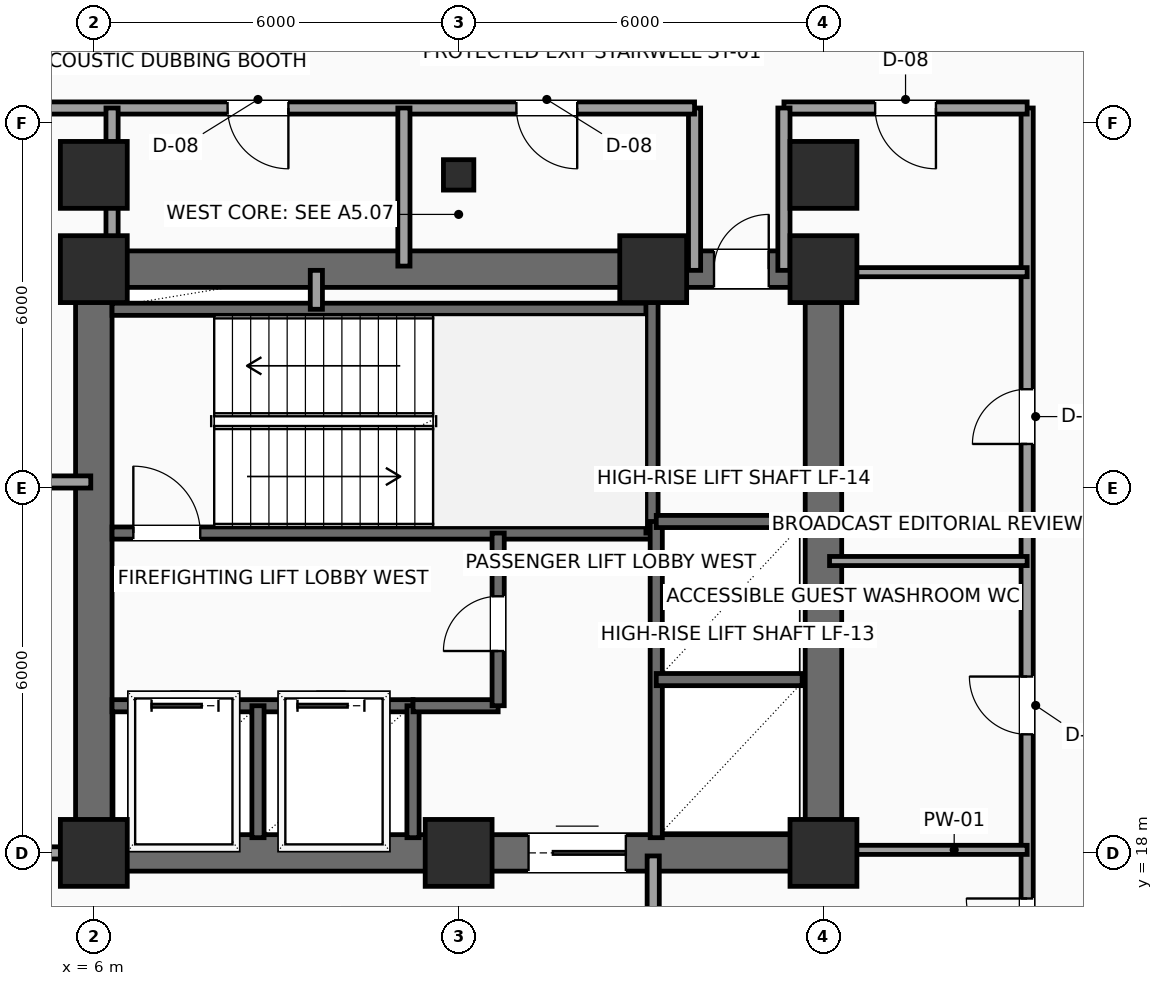
"""IFC4 building model, lengths in metres.
Left out: names, types, materials, properties, quantities, classifications, styles, units other than length and angle.
Written with IfcOpenShell. Run it as: python <this file> out.ifc"""

import sys

from ifc_helpers import new_model, si_unit, direction, frame, frame_2d, origin, origin_2d, place, context, subcontext, project, spatial, rectangle, hollow_rectangle, extrude, element, fill, save


model = new_model("IFC4")
c1 = context("Model", 3, precision=1e-05, world=origin(), true_north=direction((0.0, 1.0)))
c2 = subcontext(c1, "Body", "Model", "MODEL_VIEW")
j1 = project(units=[si_unit("LENGTHUNIT", "METRE"), si_unit("PLANEANGLEUNIT", "RADIAN")], contexts=[c1])
p1 = place(None, origin())
s1 = spatial("IfcSite", under=j1, at=p1, CompositionType="ELEMENT")
p2 = place(p1, origin())
s2 = spatial("IfcBuilding", under=s1, at=p2, CompositionType="ELEMENT")
p3 = place(p2, frame((0.0, 0.0, 119.4)))
s3 = spatial("IfcBuildingStorey", under=s2, at=p3, CompositionType="ELEMENT", Elevation=119.4)
for number, where, z_axis, x_axis in (
    (1, (6.0, 18.0, 0.0), (0.0, 0.0, 1.0), (1.0, 0.0, 0.0)),
    (2, (12.0, 18.0, 0.0), (0.0, 0.0, 1.0), (1.0, 0.0, 0.0)),
    (3, (18.0, 18.0, 0.0), (0.0, 0.0, 1.0), (1.0, 0.0, 0.0)),
    (4, (6.0, 27.6, 0.0), (0.0, 0.0, 1.0), (1.0, 0.0, 0.0)),
    (5, (15.2, 27.6, 0.0), (0.0, 0.0, 1.0), (1.0, 0.0, 0.0)),
    (6, (18.0, 27.6, 0.0), (0.0, 0.0, 1.0), (1.0, 0.0, 0.0)),
    (7, (6.0, 29.15, 0.0), (0.0, 0.0, 1.0), (1.0, 0.0, 0.0)),
):
    element("IfcColumn", number, at=place(p3, frame(where, z_axis=z_axis, x_axis=x_axis)), inside=s3, PredefinedType="COLUMN", context=c2, shape_type="SweptSolid", body=[
        extrude(rectangle(XDim=1.1, YDim=1.1, at=origin_2d()), origin(), (0.0, 0.0, 1.0), 3.75),
    ])
p4 = place(p3, frame((12.0, 29.15, 0.0), z_axis=(0.0, 0.0, 1.0), x_axis=(1.0, 0.0, 0.0)))
e8 = element("IfcColumn", 8, at=p4, inside=s3, PredefinedType="COLUMN", context=c2, shape_type="SweptSolid", body=[
    extrude(hollow_rectangle(XDim=0.5, YDim=0.5, WallThickness=0.025, InnerFilletRadius=0.025, OuterFilletRadius=0.04, at=origin_2d()), origin(), (0.0, 0.0, 1.0), 3.75),
])
p5 = place(p3, frame((18.0, 29.15, 0.0), z_axis=(0.0, 0.0, 1.0), x_axis=(1.0, 0.0, 0.0)))
e9 = element("IfcColumn", 9, at=p5, inside=s3, PredefinedType="COLUMN", context=c2, shape_type="SweptSolid", body=[
    extrude(rectangle(XDim=1.1, YDim=1.1, at=origin_2d()), origin(), (0.0, 0.0, 1.0), 3.75),
])
p6 = place(p3, frame((6.0, 18.0, 0.0), z_axis=(0.0, 0.0, 1.0), x_axis=(1.0, 0.0, 0.0)))
e10 = element("IfcWall", 10, at=p6, inside=s3, PredefinedType="SHEAR", context=c2, shape_type="SweptSolid", body=[
    extrude(rectangle(XDim=12.0, YDim=0.6, at=frame_2d((6.0, 0.0))), origin(), (0.0, 0.0, 1.0), 3.525),
])
p7 = place(p6, frame((7.15, 0.0, 0.0)))
e11 = element("IfcOpeningElement", 11, at=p7, cuts=e10, PredefinedType="OPENING", context=c2, shape_type="SweptSolid", body=[
    extrude(rectangle(XDim=1.6, YDim=2.3, at=frame_2d((0.8, 1.15))), frame((0.0, 0.31, 0.0), z_axis=(0.0, -1.0, 0.0), x_axis=(1.0, 0.0, 0.0)), (0.0, 0.0, 1.0), 0.62),
])
p8 = place(p3, frame((6.0, 27.6, 0.0), z_axis=(0.0, 0.0, 1.0), x_axis=(1.0, 0.0, 0.0)))
e12 = element("IfcWall", 12, at=p8, inside=s3, PredefinedType="SHEAR", context=c2, shape_type="SweptSolid", body=[
    extrude(rectangle(XDim=12.0, YDim=0.6, at=frame_2d((6.0, 0.0))), origin(), (0.0, 0.0, 1.0), 3.525),
])
p9 = place(p8, frame((10.2, 0.0, 0.0)))
e13 = element("IfcOpeningElement", 13, at=p9, cuts=e12, PredefinedType="OPENING", context=c2, shape_type="SweptSolid", body=[
    extrude(rectangle(XDim=0.9, YDim=2.15, at=frame_2d((0.45, 1.075))), frame((0.0, 0.31, 0.0), z_axis=(0.0, -1.0, 0.0), x_axis=(1.0, 0.0, 0.0)), (0.0, 0.0, 1.0), 0.62),
])
for number, where, z_axis, x_axis in (
    (14, (6.0, 18.0, 0.0), (0.0, 0.0, 1.0), (0.0, 1.0, 0.0)),
    (15, (18.0, 18.0, 0.0), (0.0, 0.0, 1.0), (0.0, 1.0, 0.0)),
):
    element("IfcWall", number, at=place(p3, frame(where, z_axis=z_axis, x_axis=x_axis)), inside=s3, PredefinedType="SHEAR", context=c2, shape_type="SweptSolid", body=[
        extrude(rectangle(XDim=9.6, YDim=0.6, at=frame_2d((4.8, 0.0))), origin(), (0.0, 0.0, 1.0), 3.525),
    ])
p10 = place(p3, frame((6.3, 23.26, 0.0), z_axis=(0.0, 0.0, 1.0), x_axis=(1.0, 0.0, 0.0)))
e16 = element("IfcWall", 16, at=p10, inside=s3, PredefinedType="SHEAR", context=c2, shape_type="SweptSolid", body=[
    extrude(rectangle(XDim=8.88, YDim=0.2, at=frame_2d((4.44, 0.0))), origin(), (0.0, 0.0, 1.0), 3.525),
])
p11 = place(p10, frame((0.35, 0.0, 0.0)))
e17 = element("IfcOpeningElement", 17, at=p11, cuts=e16, PredefinedType="OPENING", context=c2, shape_type="SweptSolid", body=[
    extrude(rectangle(XDim=1.1, YDim=2.2, at=frame_2d((0.55, 1.1))), frame((0.0, 0.11, 0.0), z_axis=(0.0, -1.0, 0.0), x_axis=(1.0, 0.0, 0.0)), (0.0, 0.0, 1.0), 0.22),
])
p12 = place(p3, frame((6.3, 26.94, 0.0), z_axis=(0.0, 0.0, 1.0), x_axis=(1.0, 0.0, 0.0)))
e18 = element("IfcWall", 18, at=p12, inside=s3, PredefinedType="SHEAR", context=c2, shape_type="SweptSolid", body=[
    extrude(rectangle(XDim=8.88, YDim=0.2, at=frame_2d((4.44, 0.0))), origin(), (0.0, 0.0, 1.0), 3.525),
])
p13 = place(p3, frame((15.18, 23.26, 0.0), z_axis=(0.0, 0.0, 1.0), x_axis=(0.0, 1.0, 0.0)))
e19 = element("IfcWall", 19, at=p13, inside=s3, PredefinedType="SHEAR", context=c2, shape_type="SweptSolid", body=[
    extrude(rectangle(XDim=4.04, YDim=0.2, at=frame_2d((2.02, 0.0))), origin(), (0.0, 0.0, 1.0), 3.525),
])
p14 = place(p3, frame((6.3, 20.42, 0.0), z_axis=(0.0, 0.0, 1.0), x_axis=(1.0, 0.0, 0.0)))
e20 = element("IfcWall", 20, at=p14, inside=s3, PredefinedType="SHEAR", context=c2, shape_type="SweptSolid", body=[
    extrude(rectangle(XDim=4.95, YDim=0.2, at=frame_2d((2.475, 0.0))), origin(), (0.0, 0.0, 1.0), 3.525),
])
p15 = place(p14, frame((0.65, 0.0, 0.0)))
e21 = element("IfcOpeningElement", 21, at=p15, cuts=e20, PredefinedType="OPENING", context=c2, shape_type="SweptSolid", body=[
    extrude(rectangle(XDim=1.1, YDim=2.2, at=frame_2d((0.55, 1.1))), frame((0.0, 0.11, 0.0), z_axis=(0.0, -1.0, 0.0), x_axis=(1.0, 0.0, 0.0)), (0.0, 0.0, 1.0), 0.22),
])
p16 = place(p14, frame((3.05, 0.0, 0.0)))
e22 = element("IfcOpeningElement", 22, at=p16, cuts=e20, PredefinedType="OPENING", context=c2, shape_type="SweptSolid", body=[
    extrude(rectangle(XDim=1.1, YDim=2.2, at=frame_2d((0.55, 1.1))), frame((0.0, 0.11, 0.0), z_axis=(0.0, -1.0, 0.0), x_axis=(1.0, 0.0, 0.0)), (0.0, 0.0, 1.0), 0.22),
])
for number, where, z_axis, x_axis in (
    (23, (8.7, 18.25, 0.0), (0.0, 0.0, 1.0), (0.0, 1.0, 0.0)),
    (24, (11.25, 18.25, 0.0), (0.0, 0.0, 1.0), (0.0, 1.0, 0.0)),
):
    element("IfcWall", number, at=place(p3, frame(where, z_axis=z_axis, x_axis=x_axis)), inside=s3, PredefinedType="SHEAR", context=c2, shape_type="SweptSolid", body=[
        extrude(rectangle(XDim=2.17, YDim=0.2, at=frame_2d((1.085, 0.0))), origin(), (0.0, 0.0, 1.0), 3.525),
    ])
p17 = place(p3, frame((11.25, 20.42, 0.0), z_axis=(0.0, 0.0, 1.0), x_axis=(1.0, 0.0, 0.0)))
e25 = element("IfcWall", 25, at=p17, inside=s3, PredefinedType="SHEAR", context=c2, shape_type="SweptSolid", body=[
    extrude(rectangle(XDim=1.4, YDim=0.2, at=frame_2d((0.7, 0.0))), origin(), (0.0, 0.0, 1.0), 3.525),
])
p18 = place(p3, frame((12.65, 20.42, 0.0), z_axis=(0.0, 0.0, 1.0), x_axis=(0.0, 1.0, 0.0)))
e26 = element("IfcWall", 26, at=p18, inside=s3, PredefinedType="SHEAR", context=c2, shape_type="SweptSolid", body=[
    extrude(rectangle(XDim=2.84, YDim=0.2, at=frame_2d((1.42, 0.0))), origin(), (0.0, 0.0, 1.0), 3.525),
])
p19 = place(p18, frame((0.9, 0.0, 0.0)))
e27 = element("IfcOpeningElement", 27, at=p19, cuts=e26, PredefinedType="OPENING", context=c2, shape_type="SweptSolid", body=[
    extrude(rectangle(XDim=0.9, YDim=2.15, at=frame_2d((0.45, 1.075))), frame((0.0, 0.11, 0.0), z_axis=(0.0, -1.0, 0.0), x_axis=(1.0, 0.0, 0.0)), (0.0, 0.0, 1.0), 0.22),
])
p20 = place(p3, frame((9.66, 26.94, 0.0), z_axis=(0.0, 0.0, 1.0), x_axis=(0.0, 1.0, 0.0)))
e28 = element("IfcWall", 28, at=p20, inside=s3, PredefinedType="SOLIDWALL", context=c2, shape_type="SweptSolid", body=[
    extrude(rectangle(XDim=0.64, YDim=0.2, at=frame_2d((0.32, 0.0))), origin(), (0.0, 0.0, 1.0), 3.525),
])
p21 = place(p3, frame((15.25, 18.25, 0.0), z_axis=(0.0, 0.0, 1.0), x_axis=(0.0, 1.0, 0.0)))
e29 = element("IfcWall", 29, at=p21, inside=s3, PredefinedType="SHEAR", context=c2, shape_type="SweptSolid", body=[
    extrude(rectangle(XDim=5.2, YDim=0.2, at=frame_2d((2.6, 0.0))), origin(), (0.0, 0.0, 1.0), 3.525),
])
p22 = place(p3, frame((15.25, 20.85, 0.0), z_axis=(0.0, 0.0, 1.0), x_axis=(1.0, 0.0, 0.0)))
e30 = element("IfcWall", 30, at=p22, inside=s3, PredefinedType="SHEAR", context=c2, shape_type="SweptSolid", body=[
    extrude(rectangle(XDim=2.4, YDim=0.2, at=frame_2d((1.2, 0.0))), origin(), (0.0, 0.0, 1.0), 3.525),
])
p23 = place(p3, frame((15.25, 23.45, 0.0), z_axis=(0.0, 0.0, 1.0), x_axis=(1.0, 0.0, 0.0)))
e31 = element("IfcWall", 31, at=p23, inside=s3, PredefinedType="SHEAR", context=c2, shape_type="SweptSolid", body=[
    extrude(rectangle(XDim=2.45, YDim=0.2, at=frame_2d((1.225, 0.0))), origin(), (0.0, 0.0, 1.0), 3.525),
])
p24 = place(p3, frame((15.2, 17.95, 0.0), z_axis=(0.0, 0.0, 1.0), x_axis=(0.0, -1.0, 0.0)))
e32 = element("IfcWall", 32, at=p24, inside=s3, PredefinedType="SOLIDWALL", context=c2, shape_type="SweptSolid", body=[
    extrude(rectangle(XDim=2.4, YDim=0.2, at=frame_2d((1.2, 0.0))), origin(), (0.0, 0.0, 1.0), 3.525),
])
p25 = place(p3, frame((21.35, 11.25, 0.0), z_axis=(0.0, 0.0, 1.0), x_axis=(0.0, 1.0, 0.0)))
e33 = element("IfcWall", 33, at=p25, inside=s3, PredefinedType="SOLIDWALL", context=c2, shape_type="SweptSolid", body=[
    extrude(rectangle(XDim=19.0, YDim=0.2, at=frame_2d((9.5, 0.0))), origin(), (0.0, 0.0, 1.0), 3.525),
])
p26 = place(p25, frame((8.7, 0.0, 0.0)))
e34 = element("IfcOpeningElement", 34, at=p26, cuts=e33, PredefinedType="OPENING", context=c2, shape_type="SweptSolid", body=[
    extrude(rectangle(XDim=0.95, YDim=2.15, at=frame_2d((0.475, 1.075))), frame((0.0, 0.11, 0.0), z_axis=(0.0, -1.0, 0.0), x_axis=(1.0, 0.0, 0.0)), (0.0, 0.0, 1.0), 0.22),
])
p27 = place(p25, frame((13.475, 0.0, 0.0)))
e35 = element("IfcOpeningElement", 35, at=p27, cuts=e33, PredefinedType="OPENING", context=c2, shape_type="SweptSolid", body=[
    extrude(rectangle(XDim=0.9, YDim=2.1, at=frame_2d((0.45, 1.05))), frame((0.0, 0.11, 0.0), z_axis=(0.0, -1.0, 0.0), x_axis=(1.0, 0.0, 0.0)), (0.0, 0.0, 1.0), 0.22),
])
p28 = place(p25, frame((5.0, 0.0, 0.0)))
e36 = element("IfcOpeningElement", 36, at=p28, cuts=e33, PredefinedType="OPENING", context=c2, shape_type="SweptSolid", body=[
    extrude(rectangle(XDim=1.0, YDim=2.2, at=frame_2d((0.5, 1.1))), frame((0.0, 0.11, 0.0), z_axis=(0.0, -1.0, 0.0), x_axis=(1.0, 0.0, 0.0)), (0.0, 0.0, 1.0), 0.22),
])
p29 = place(p3, frame((21.35, 30.25, 0.0), z_axis=(0.0, 0.0, 1.0), x_axis=(-1.0, 0.0, 0.0)))
e37 = element("IfcWall", 37, at=p29, inside=s3, PredefinedType="SOLIDWALL", context=c2, shape_type="SweptSolid", body=[
    extrude(rectangle(XDim=4.0, YDim=0.2, at=frame_2d((2.0, 0.0))), origin(), (0.0, 0.0, 1.0), 3.525),
])
p30 = place(p29, frame((1.5, 0.0, 0.0)))
e38 = element("IfcOpeningElement", 38, at=p30, cuts=e37, PredefinedType="OPENING", context=c2, shape_type="SweptSolid", body=[
    extrude(rectangle(XDim=1.0, YDim=2.2, at=frame_2d((0.5, 1.1))), frame((0.0, 0.11, 0.0), z_axis=(0.0, -1.0, 0.0), x_axis=(1.0, 0.0, 0.0)), (0.0, 0.0, 1.0), 0.22),
])
for number, where, z_axis, x_axis in (
    (39, (17.35, 30.25, 0.0), (0.0, 0.0, 1.0), (0.0, -1.0, 0.0)),
    (40, (15.88, 27.58, 0.0), (0.0, 0.0, 1.0), (0.0, 1.0, 0.0)),
):
    element("IfcWall", number, at=place(p3, frame(where, z_axis=z_axis, x_axis=x_axis)), inside=s3, PredefinedType="SOLIDWALL", context=c2, shape_type="SweptSolid", body=[
        extrude(rectangle(XDim=2.67, YDim=0.2, at=frame_2d((1.335, 0.0))), origin(), (0.0, 0.0, 1.0), 3.525),
    ])
p31 = place(p3, frame((15.88, 30.25, 0.0), z_axis=(0.0, 0.0, 1.0), x_axis=(-1.0, 0.0, 0.0)))
e41 = element("IfcWall", 41, at=p31, inside=s3, PredefinedType="SOLIDWALL", context=c2, shape_type="SweptSolid", body=[
    extrude(rectangle(XDim=15.58, YDim=0.2, at=frame_2d((7.79, 0.0))), origin(), (0.0, 0.0, 1.0), 3.525),
])
p32 = place(p31, frame((12.23, 0.0, 0.0)))
e42 = element("IfcOpeningElement", 42, at=p32, cuts=e41, PredefinedType="OPENING", context=c2, shape_type="SweptSolid", body=[
    extrude(rectangle(XDim=1.0, YDim=2.2, at=frame_2d((0.5, 1.1))), frame((0.0, 0.11, 0.0), z_axis=(0.0, -1.0, 0.0), x_axis=(1.0, 0.0, 0.0)), (0.0, 0.0, 1.0), 0.22),
])
p33 = place(p31, frame((6.68, 0.0, 0.0)))
e43 = element("IfcOpeningElement", 43, at=p33, cuts=e41, PredefinedType="OPENING", context=c2, shape_type="SweptSolid", body=[
    extrude(rectangle(XDim=1.0, YDim=2.2, at=frame_2d((0.5, 1.1))), frame((0.0, 0.11, 0.0), z_axis=(0.0, -1.0, 0.0), x_axis=(1.0, 0.0, 0.0)), (0.0, 0.0, 1.0), 0.22),
])
p34 = place(p31, frame((1.93, 0.0, 0.0)))
e44 = element("IfcOpeningElement", 44, at=p34, cuts=e41, PredefinedType="OPENING", context=c2, shape_type="SweptSolid", body=[
    extrude(rectangle(XDim=1.0, YDim=2.2, at=frame_2d((0.5, 1.1))), frame((0.0, 0.11, 0.0), z_axis=(0.0, -1.0, 0.0), x_axis=(1.0, 0.0, 0.0)), (0.0, 0.0, 1.0), 0.22),
])
p35 = place(p3, frame((18.1, 18.05, 0.0), z_axis=(0.0, 0.0, 1.0), x_axis=(1.0, 0.0, 0.0)))
e45 = element("IfcWall", 45, at=p35, inside=s3, PredefinedType="PARTITIONING", context=c2, shape_type="SweptSolid", body=[
    extrude(rectangle(XDim=3.25, YDim=0.15, at=frame_2d((1.625, 0.0))), origin(), (0.0, 0.0, 1.0), 3.017),
])
for number, where, z_axis, x_axis in (
    (46, (18.1, 22.8, 0.0), (0.0, 0.0, 1.0), (1.0, 0.0, 0.0)),
    (47, (18.1, 27.55, 0.0), (0.0, 0.0, 1.0), (1.0, 0.0, 0.0)),
):
    element("IfcWall", number, at=place(p3, frame(where, z_axis=z_axis, x_axis=x_axis)), inside=s3, PredefinedType="PARTITIONING", context=c2, shape_type="SweptSolid", body=[
        extrude(rectangle(XDim=3.25, YDim=0.15, at=frame_2d((1.625, 0.0))), origin(), (0.0, 0.0, 1.0), 3.525),
    ])
p36 = place(p3, frame((0.3, 18.0, 0.0), z_axis=(0.0, 0.0, 1.0), x_axis=(1.0, 0.0, 0.0)))
e48 = element("IfcWall", 48, at=p36, inside=s3, PredefinedType="PARTITIONING", context=c2, shape_type="SweptSolid", body=[
    extrude(rectangle(XDim=5.65, YDim=0.2, at=frame_2d((2.825, 0.0))), origin(), (0.0, 0.0, 1.0), 3.017),
])
p37 = place(p36, frame((2.35, 0.0, 0.0)))
e49 = element("IfcOpeningElement", 49, at=p37, cuts=e48, PredefinedType="OPENING", context=c2, shape_type="SweptSolid", body=[
    extrude(rectangle(XDim=1.0, YDim=2.2, at=frame_2d((0.5, 1.1))), frame((0.0, 0.11, 0.0), z_axis=(0.0, -1.0, 0.0), x_axis=(1.0, 0.0, 0.0)), (0.0, 0.0, 1.0), 0.22),
])
p38 = place(p3, frame((0.3, 24.1, 0.0), z_axis=(0.0, 0.0, 1.0), x_axis=(1.0, 0.0, 0.0)))
e50 = element("IfcWall", 50, at=p38, inside=s3, PredefinedType="PARTITIONING", context=c2, shape_type="SweptSolid", body=[
    extrude(rectangle(XDim=5.65, YDim=0.2, at=frame_2d((2.825, 0.0))), origin(), (0.0, 0.0, 1.0), 3.525),
])
p39 = place(p3, frame((6.3, 27.65, 0.0), z_axis=(0.0, 0.0, 1.0), x_axis=(0.0, 1.0, 0.0)))
e51 = element("IfcWall", 51, at=p39, inside=s3, PredefinedType="PARTITIONING", context=c2, shape_type="SweptSolid", body=[
    extrude(rectangle(XDim=2.6, YDim=0.2, at=frame_2d((1.3, 0.0))), origin(), (0.0, 0.0, 1.0), 3.017),
])
p40 = place(p3, frame((11.1, 27.65, 0.0), z_axis=(0.0, 0.0, 1.0), x_axis=(0.0, 1.0, 0.0)))
e52 = element("IfcWall", 52, at=p40, inside=s3, PredefinedType="PARTITIONING", context=c2, shape_type="SweptSolid", body=[
    extrude(rectangle(XDim=2.6, YDim=0.2, at=frame_2d((1.3, 0.0))), origin(), (0.0, 0.0, 1.0), 3.525),
])
p41 = place(p7, origin())
e53 = element("IfcDoor", 53, at=p41, inside=s3, OperationType="DOUBLE_DOOR_SLIDING", PredefinedType="DOOR", context=c2, shape_type="SweptSolid", body=[
    extrude(rectangle(XDim=1.6, YDim=2.3, at=frame_2d((0.8, 1.15))), frame((0.0, 0.025, 0.0), z_axis=(0.0, -1.0, 0.0), x_axis=(1.0, 0.0, 0.0)), (0.0, 0.0, 1.0), 0.05),
])
fill(e11, e53)
p42 = place(p9, origin())
e54 = element("IfcDoor", 54, at=p42, inside=s3, OperationType="SINGLE_SWING_RIGHT", PredefinedType="DOOR", context=c2, shape_type="SweptSolid", body=[
    extrude(rectangle(XDim=0.9, YDim=2.15, at=frame_2d((0.45, 1.075))), frame((0.0, 0.025, 0.0), z_axis=(0.0, -1.0, 0.0), x_axis=(1.0, 0.0, 0.0)), (0.0, 0.0, 1.0), 0.05),
])
fill(e13, e54)
p43 = place(p11, origin())
e55 = element("IfcDoor", 55, at=p43, inside=s3, OperationType="SINGLE_SWING_LEFT", PredefinedType="DOOR", context=c2, shape_type="SweptSolid", body=[
    extrude(rectangle(XDim=1.1, YDim=2.2, at=frame_2d((0.55, 1.1))), frame((0.0, 0.025, 0.0), z_axis=(0.0, -1.0, 0.0), x_axis=(1.0, 0.0, 0.0)), (0.0, 0.0, 1.0), 0.05),
])
fill(e17, e55)
p44 = place(p15, origin())
e56 = element("IfcDoor", 56, at=p44, inside=s3, OperationType="SLIDING_TO_LEFT", PredefinedType="DOOR", context=c2, shape_type="SweptSolid", body=[
    extrude(rectangle(XDim=1.1, YDim=2.2, at=frame_2d((0.55, 1.1))), frame((0.0, 0.025, 0.0), z_axis=(0.0, -1.0, 0.0), x_axis=(1.0, 0.0, 0.0)), (0.0, 0.0, 1.0), 0.05),
])
fill(e21, e56)
p45 = place(p16, origin())
e57 = element("IfcDoor", 57, at=p45, inside=s3, OperationType="SLIDING_TO_LEFT", PredefinedType="DOOR", context=c2, shape_type="SweptSolid", body=[
    extrude(rectangle(XDim=1.1, YDim=2.2, at=frame_2d((0.55, 1.1))), frame((0.0, 0.025, 0.0), z_axis=(0.0, -1.0, 0.0), x_axis=(1.0, 0.0, 0.0)), (0.0, 0.0, 1.0), 0.05),
])
fill(e22, e57)
p46 = place(p19, origin())
e58 = element("IfcDoor", 58, at=p46, inside=s3, OperationType="SINGLE_SWING_LEFT", PredefinedType="DOOR", context=c2, shape_type="SweptSolid", body=[
    extrude(rectangle(XDim=0.9, YDim=2.15, at=frame_2d((0.45, 1.075))), frame((0.0, 0.025, 0.0), z_axis=(0.0, -1.0, 0.0), x_axis=(1.0, 0.0, 0.0)), (0.0, 0.0, 1.0), 0.05),
])
fill(e27, e58)
p47 = place(p26, origin())
e59 = element("IfcDoor", 59, at=p47, inside=s3, OperationType="SINGLE_SWING_RIGHT", PredefinedType="DOOR", context=c2, shape_type="SweptSolid", body=[
    extrude(rectangle(XDim=0.95, YDim=2.15, at=frame_2d((0.475, 1.075))), frame((0.0, 0.025, 0.0), z_axis=(0.0, -1.0, 0.0), x_axis=(1.0, 0.0, 0.0)), (0.0, 0.0, 1.0), 0.05),
])
fill(e34, e59)
p48 = place(p27, origin())
e60 = element("IfcDoor", 60, at=p48, inside=s3, OperationType="SINGLE_SWING_LEFT", PredefinedType="DOOR", context=c2, shape_type="SweptSolid", body=[
    extrude(rectangle(XDim=0.9, YDim=2.1, at=frame_2d((0.45, 1.05))), frame((0.0, 0.025, 0.0), z_axis=(0.0, -1.0, 0.0), x_axis=(1.0, 0.0, 0.0)), (0.0, 0.0, 1.0), 0.05),
])
fill(e35, e60)
p49 = place(p28, origin())
e61 = element("IfcDoor", 61, at=p49, inside=s3, OperationType="SINGLE_SWING_RIGHT", PredefinedType="DOOR", context=c2, shape_type="SweptSolid", body=[
    extrude(rectangle(XDim=1.0, YDim=2.2, at=frame_2d((0.5, 1.1))), frame((0.0, 0.025, 0.0), z_axis=(0.0, -1.0, 0.0), x_axis=(1.0, 0.0, 0.0)), (0.0, 0.0, 1.0), 0.05),
])
fill(e36, e61)
p50 = place(p30, origin())
e62 = element("IfcDoor", 62, at=p50, inside=s3, OperationType="SINGLE_SWING_LEFT", PredefinedType="DOOR", context=c2, shape_type="SweptSolid", body=[
    extrude(rectangle(XDim=1.0, YDim=2.2, at=frame_2d((0.5, 1.1))), frame((0.0, 0.025, 0.0), z_axis=(0.0, -1.0, 0.0), x_axis=(1.0, 0.0, 0.0)), (0.0, 0.0, 1.0), 0.05),
])
fill(e38, e62)
p51 = place(p33, origin())
e63 = element("IfcDoor", 63, at=p51, inside=s3, OperationType="SINGLE_SWING_LEFT", PredefinedType="DOOR", context=c2, shape_type="SweptSolid", body=[
    extrude(rectangle(XDim=1.0, YDim=2.2, at=frame_2d((0.5, 1.1))), frame((0.0, 0.025, 0.0), z_axis=(0.0, -1.0, 0.0), x_axis=(1.0, 0.0, 0.0)), (0.0, 0.0, 1.0), 0.05),
])
fill(e43, e63)
p52 = place(p34, origin())
e64 = element("IfcDoor", 64, at=p52, inside=s3, OperationType="SINGLE_SWING_LEFT", PredefinedType="DOOR", context=c2, shape_type="SweptSolid", body=[
    extrude(rectangle(XDim=1.0, YDim=2.2, at=frame_2d((0.5, 1.1))), frame((0.0, 0.025, 0.0), z_axis=(0.0, -1.0, 0.0), x_axis=(1.0, 0.0, 0.0)), (0.0, 0.0, 1.0), 0.05),
])
fill(e44, e64)
save(model, sys.argv[1])
